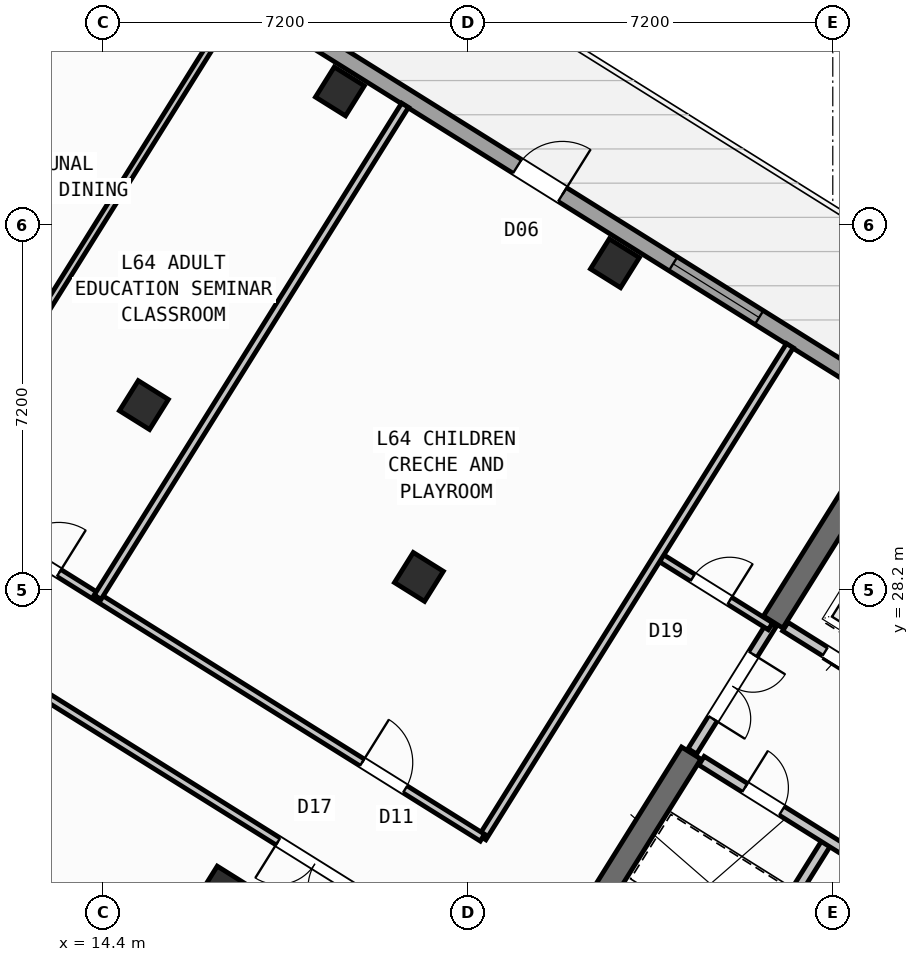
"""IFC4 building model, lengths in metres.
Left out: names, types, materials, properties, quantities, classifications, styles, units other than length and angle.
Written with IfcOpenShell. Run it as: python <this file> out.ifc"""

import sys

from ifc_helpers import new_model, si_unit, direction, frame, frame_2d, origin, origin_2d, place, context, subcontext, project, spatial, rectangle, hollow_rectangle, extrude, source, transform, mapped, element, fill, save


model = new_model("IFC4")
c1 = context("Model", 3, precision=1e-05, world=origin(), true_north=direction((0.0, 1.0)))
c2 = subcontext(c1, "Body", "Model", "MODEL_VIEW")
j1 = project(units=[si_unit("LENGTHUNIT", "METRE"), si_unit("PLANEANGLEUNIT", "RADIAN")], contexts=[c1])
p1 = place(None, origin())
s1 = spatial("IfcSite", under=j1, at=p1, CompositionType="ELEMENT")
p2 = place(p1, origin())
s2 = spatial("IfcBuilding", under=s1, at=p2, CompositionType="ELEMENT")
p3 = place(p2, frame((0.0, 0.0, 254.7)))
s3 = spatial("IfcBuildingStorey", under=s2, at=p3, CompositionType="ELEMENT", Elevation=254.7)
p4 = place(p3, frame((29.544, 30.636, 0.0), z_axis=(0.0, 0.0, 1.0), x_axis=(-0.529902075036, -0.848058836916, 0.0)))
e1 = element("IfcWall", 1, at=p4, inside=s3, PredefinedType="SHEAR", context=c2, shape_type="SweptSolid", body=[
    extrude(rectangle(XDim=3.625, YDim=0.45, at=frame_2d((1.812, 0.0))), origin(), (0.0, 0.0, 1.0), 4.25),
])
p5 = place(p3, frame((26.007, 24.976, 0.0), z_axis=(0.0, 0.0, 1.0), x_axis=(-0.529931155655, -0.848040665456, 0.0)))
e2 = element("IfcWall", 2, at=p5, inside=s3, PredefinedType="SHEAR", context=c2, shape_type="SweptSolid", body=[
    extrude(rectangle(XDim=6.475, YDim=0.45, at=frame_2d((3.238, 0.0))), origin(), (0.0, 0.0, 1.0), 4.25),
])
m1 = source(origin(), c2, "Body", "SweptSolid", [
    extrude(hollow_rectangle(XDim=0.7, YDim=0.7, WallThickness=0.028, at=origin_2d()), origin(), (0.0, 0.0, 1.0), 4.5),
])
for number, where, z_axis, x_axis in (
    (3, (24.5, 34.643, 0.0), (0.0, 0.0, 1.0), (-0.848, 0.53, 0.0)),
    (4, (20.632, 28.452, 0.0), (0.0, 0.0, 1.0), (-0.848, 0.53, 0.0)),
    (5, (16.764, 22.261, 0.0), (0.0, 0.0, 1.0), (-0.848, 0.53, 0.0)),
    (6, (19.073, 38.034, 0.0), (0.0, 0.0, 1.0), (-0.848, 0.53, 0.0)),
    (7, (15.205, 31.844, 0.0), (0.0, 0.0, 1.0), (-0.848, 0.53, 0.0)),
):
    element("IfcColumn", number, at=place(p3, frame(where, z_axis=z_axis, x_axis=x_axis)), inside=s3, PredefinedType="COLUMN", context=c2, shape_type="MappedRepresentation", body=[
        mapped(m1, transform((0.0, 0.0, 0.0), scale=1.0)),
    ])
p6 = place(p3, frame((29.268, 6.429, 0.0), z_axis=(0.0, 0.0, 1.0), x_axis=(-0.848049971435, 0.529916263149, 0.0)))
e8 = element("IfcWall", 8, at=p6, inside=s3, PredefinedType="STANDARD", context=c2, shape_type="SweptSolid", body=[
    extrude(rectangle(XDim=31.588, YDim=0.32, at=frame_2d((15.794, 0.0))), origin(), (0.0, 0.0, 1.0), 4.25),
])
p7 = place(p6, frame((22.349, 0.0, 0.0)))
e9 = element("IfcOpeningElement", 9, at=p7, cuts=e8, PredefinedType="OPENING", context=c2, shape_type="SweptSolid", body=[
    extrude(rectangle(XDim=1.2, YDim=2.15, at=frame_2d((0.6, 1.075))), frame((0.0, 0.17, 0.0), z_axis=(0.0, -1.0, 0.0), x_axis=(1.0, 0.0, 0.0)), (0.0, 0.0, 1.0), 0.34),
])
p8 = place(p6, frame((11.489, 0.0, 0.7)))
e10 = element("IfcOpeningElement", 10, at=p8, cuts=e8, PredefinedType="OPENING", context=c2, shape_type="SweptSolid", body=[
    extrude(rectangle(XDim=2.6, YDim=2.0, at=frame_2d((1.3, 1.0))), frame((0.0, 0.17, 0.0), z_axis=(0.0, -1.0, 0.0), x_axis=(1.0, 0.0, 0.0)), (0.0, 0.0, 1.0), 0.34),
])
p9 = place(p6, frame((17.881, 0.0, 0.75)))
e11 = element("IfcOpeningElement", 11, at=p9, cuts=e8, PredefinedType="OPENING", context=c2, shape_type="SweptSolid", body=[
    extrude(rectangle(XDim=2.0, YDim=1.95, at=frame_2d((1.0, 0.975))), frame((0.0, 0.17, 0.0), z_axis=(0.0, -1.0, 0.0), x_axis=(1.0, 0.0, 0.0)), (0.0, 0.0, 1.0), 0.34),
])
p10 = place(p6, frame((25.501, 0.0, 0.85)))
e12 = element("IfcOpeningElement", 12, at=p10, cuts=e8, PredefinedType="OPENING", context=c2, shape_type="SweptSolid", body=[
    extrude(rectangle(XDim=1.6, YDim=1.8, at=frame_2d((0.8, 0.9))), frame((0.0, 0.17, 0.0), z_axis=(0.0, -1.0, 0.0), x_axis=(1.0, 0.0, 0.0)), (0.0, 0.0, 1.0), 0.34),
])
p11 = place(p6, frame((28.725, 0.0, 0.85)))
e13 = element("IfcOpeningElement", 13, at=p11, cuts=e8, PredefinedType="OPENING", context=c2, shape_type="SweptSolid", body=[
    extrude(rectangle(XDim=1.6, YDim=1.8, at=frame_2d((0.8, 0.9))), frame((0.0, 0.17, 0.0), z_axis=(0.0, -1.0, 0.0), x_axis=(1.0, 0.0, 0.0)), (0.0, 0.0, 1.0), 0.34),
])
p12 = place(p3, frame((2.415, 23.452, 0.0), z_axis=(0.0, 0.0, 1.0), x_axis=(0.52991049553, 0.848053575387, 0.0)))
e14 = element("IfcWall", 14, at=p12, inside=s3, PredefinedType="STANDARD", context=c2, shape_type="SweptSolid", body=[
    extrude(rectangle(XDim=21.587, YDim=0.32, at=frame_2d((10.794, 0.0))), origin(), (0.0, 0.0, 1.0), 3.775),
])
p13 = place(p12, frame((2.131, 0.0, 0.7)))
e15 = element("IfcOpeningElement", 15, at=p13, cuts=e14, PredefinedType="OPENING", context=c2, shape_type="SweptSolid", body=[
    extrude(rectangle(XDim=2.6, YDim=2.0, at=frame_2d((1.3, 1.0))), frame((0.0, 0.17, 0.0), z_axis=(0.0, -1.0, 0.0), x_axis=(1.0, 0.0, 0.0)), (0.0, 0.0, 1.0), 0.34),
])
p14 = place(p12, frame((10.959, 0.0, 0.75)))
e16 = element("IfcOpeningElement", 16, at=p14, cuts=e14, PredefinedType="OPENING", context=c2, shape_type="SweptSolid", body=[
    extrude(rectangle(XDim=2.0, YDim=1.95, at=frame_2d((1.0, 0.975))), frame((0.0, 0.17, 0.0), z_axis=(0.0, -1.0, 0.0), x_axis=(1.0, 0.0, 0.0)), (0.0, 0.0, 1.0), 0.34),
])
p15 = place(p12, frame((15.269, 0.0, 0.85)))
e17 = element("IfcOpeningElement", 17, at=p15, cuts=e14, PredefinedType="OPENING", context=c2, shape_type="SweptSolid", body=[
    extrude(rectangle(XDim=1.6, YDim=1.8, at=frame_2d((0.8, 0.9))), frame((0.0, 0.17, 0.0), z_axis=(0.0, -1.0, 0.0), x_axis=(1.0, 0.0, 0.0)), (0.0, 0.0, 1.0), 0.34),
])
p16 = place(p12, frame((18.219, 0.0, 0.85)))
e18 = element("IfcOpeningElement", 18, at=p16, cuts=e14, PredefinedType="OPENING", context=c2, shape_type="SweptSolid", body=[
    extrude(rectangle(XDim=1.6, YDim=1.8, at=frame_2d((0.8, 0.9))), frame((0.0, 0.17, 0.0), z_axis=(0.0, -1.0, 0.0), x_axis=(1.0, 0.0, 0.0)), (0.0, 0.0, 1.0), 0.34),
])
p17 = place(p3, frame((14.138, 41.825, 0.0), z_axis=(0.0, 0.0, 1.0), x_axis=(0.848046498049, -0.529921821731, 0.0)))
e19 = element("IfcWall", 19, at=p17, inside=s3, PredefinedType="STANDARD", context=c2, shape_type="SweptSolid", body=[
    extrude(rectangle(XDim=31.588, YDim=0.32, at=frame_2d((15.794, 0.0))), origin(), (0.0, 0.0, 1.0), 4.25),
])
p18 = place(p17, frame((9.946, 0.0, 0.0)))
e20 = element("IfcOpeningElement", 20, at=p18, cuts=e19, PredefinedType="OPENING", context=c2, shape_type="SweptSolid", body=[
    extrude(rectangle(XDim=1.05, YDim=2.15, at=frame_2d((0.525, 1.075))), frame((0.0, 0.17, 0.0), z_axis=(0.0, -1.0, 0.0), x_axis=(1.0, 0.0, 0.0)), (0.0, 0.0, 1.0), 0.34),
])
p19 = place(p17, frame((0.763, 0.0, 0.75)))
e21 = element("IfcOpeningElement", 21, at=p19, cuts=e19, PredefinedType="OPENING", context=c2, shape_type="SweptSolid", body=[
    extrude(rectangle(XDim=2.0, YDim=1.95, at=frame_2d((1.0, 0.975))), frame((0.0, 0.17, 0.0), z_axis=(0.0, -1.0, 0.0), x_axis=(1.0, 0.0, 0.0)), (0.0, 0.0, 1.0), 0.34),
])
p20 = place(p17, frame((13.574, 0.0, 0.75)))
e22 = element("IfcOpeningElement", 22, at=p20, cuts=e19, PredefinedType="OPENING", context=c2, shape_type="SweptSolid", body=[
    extrude(rectangle(XDim=2.0, YDim=1.95, at=frame_2d((1.0, 0.975))), frame((0.0, 0.17, 0.0), z_axis=(0.0, -1.0, 0.0), x_axis=(1.0, 0.0, 0.0)), (0.0, 0.0, 1.0), 0.34),
])
p21 = place(p17, frame((21.744, 0.0, 0.85)))
e23 = element("IfcOpeningElement", 23, at=p21, cuts=e19, PredefinedType="OPENING", context=c2, shape_type="SweptSolid", body=[
    extrude(rectangle(XDim=1.6, YDim=1.8, at=frame_2d((0.8, 0.9))), frame((0.0, 0.17, 0.0), z_axis=(0.0, -1.0, 0.0), x_axis=(1.0, 0.0, 0.0)), (0.0, 0.0, 1.0), 0.34),
])
p22 = place(p17, frame((27.444, 0.0, 0.85)))
e24 = element("IfcOpeningElement", 24, at=p22, cuts=e19, PredefinedType="OPENING", context=c2, shape_type="SweptSolid", body=[
    extrude(rectangle(XDim=1.6, YDim=1.8, at=frame_2d((0.8, 0.9))), frame((0.0, 0.17, 0.0), z_axis=(0.0, -1.0, 0.0), x_axis=(1.0, 0.0, 0.0)), (0.0, 0.0, 1.0), 0.34),
])
p23 = place(p3, frame((31.822, 24.998, 0.0), z_axis=(0.0, 0.0, 1.0), x_axis=(-0.848054125777, 0.529909614701, 0.0)))
e25 = element("IfcWall", 25, at=p23, inside=s3, PredefinedType="STANDARD", context=c2, shape_type="SweptSolid", body=[
    extrude(rectangle(XDim=4.668, YDim=0.2, at=frame_2d((2.334, 0.0))), origin(), (0.0, 0.0, 1.0), 4.24),
])
p24 = place(p23, frame((0.52, 0.0, 0.0)))
e26 = element("IfcOpeningElement", 26, at=p24, cuts=e25, PredefinedType="OPENING", context=c2, shape_type="SweptSolid", body=[
    extrude(rectangle(XDim=1.2, YDim=2.15, at=frame_2d((0.6, 1.075))), frame((0.0, 0.11, 0.0), z_axis=(0.0, -1.0, 0.0), x_axis=(1.0, 0.0, 0.0)), (0.0, 0.0, 1.0), 0.22),
])
p25 = place(p23, frame((2.54, 0.0, 0.0)))
e27 = element("IfcOpeningElement", 27, at=p25, cuts=e25, PredefinedType="OPENING", context=c2, shape_type="SweptSolid", body=[
    extrude(rectangle(XDim=1.2, YDim=2.15, at=frame_2d((0.6, 1.075))), frame((0.0, 0.11, 0.0), z_axis=(0.0, -1.0, 0.0), x_axis=(1.0, 0.0, 0.0)), (0.0, 0.0, 1.0), 0.22),
])
p26 = place(p3, frame((28.71, 23.263, 0.0), z_axis=(0.0, 0.0, 1.0), x_axis=(-0.529907497854, -0.848055448493, 0.0)))
e28 = element("IfcWall", 28, at=p26, inside=s3, PredefinedType="STANDARD", context=c2, shape_type="SweptSolid", body=[
    extrude(rectangle(XDim=2.88, YDim=0.2, at=frame_2d((1.44, 0.0))), origin(), (0.0, 0.0, 1.0), 4.24),
])
p27 = place(p3, frame((31.525, 21.504, 0.0), z_axis=(0.0, 0.0, 1.0), x_axis=(-0.848042066329, 0.529928913853, 0.0)))
e29 = element("IfcWall", 29, at=p27, inside=s3, PredefinedType="STANDARD", context=c2, shape_type="SweptSolid", body=[
    extrude(rectangle(XDim=6.268, YDim=0.2, at=frame_2d((3.134, 0.0))), origin(), (0.0, 0.0, 1.0), 4.24),
])
p28 = place(p27, frame((4.4, 0.0, 0.0)))
e30 = element("IfcOpeningElement", 30, at=p28, cuts=e29, PredefinedType="OPENING", context=c2, shape_type="SweptSolid", body=[
    extrude(rectangle(XDim=0.86, YDim=2.05, at=frame_2d((0.43, 1.025))), frame((0.0, 0.11, 0.0), z_axis=(0.0, -1.0, 0.0), x_axis=(1.0, 0.0, 0.0)), (0.0, 0.0, 1.0), 0.22),
])
p29 = place(p27, frame((1.45, 0.0, 0.0)))
e31 = element("IfcOpeningElement", 31, at=p29, cuts=e29, PredefinedType="OPENING", context=c2, shape_type="SweptSolid", body=[
    extrude(rectangle(XDim=0.86, YDim=2.05, at=frame_2d((0.43, 1.025))), frame((0.0, 0.11, 0.0), z_axis=(0.0, -1.0, 0.0), x_axis=(1.0, 0.0, 0.0)), (0.0, 0.0, 1.0), 0.22),
])
p30 = place(p3, frame((27.596, 27.52, 0.0), z_axis=(0.0, 0.0, 1.0), x_axis=(-0.529865479138, -0.848081702443, 0.0)))
e32 = element("IfcWall", 32, at=p30, inside=s3, PredefinedType="STANDARD", context=c2, shape_type="SweptSolid", body=[
    extrude(rectangle(XDim=2.96, YDim=0.2, at=frame_2d((1.48, 0.0))), origin(), (0.0, 0.0, 1.0), 4.24),
])
p31 = place(p30, frame((0.7, 0.0, 0.0)))
e33 = element("IfcOpeningElement", 33, at=p31, cuts=e32, PredefinedType="OPENING", context=c2, shape_type="SweptSolid", body=[
    extrude(rectangle(XDim=1.5, YDim=2.15, at=frame_2d((0.75, 1.075))), frame((0.0, 0.11, 0.0), z_axis=(0.0, -1.0, 0.0), x_axis=(1.0, 0.0, 0.0)), (0.0, 0.0, 1.0), 0.22),
])
p32 = place(p3, frame((27.57, 27.478, 0.0), z_axis=(0.0, 0.0, 1.0), x_axis=(-0.848050851465, 0.529914854792, 0.0)))
e34 = element("IfcWall", 34, at=p32, inside=s3, PredefinedType="PARTITIONING", context=c2, shape_type="SweptSolid", body=[
    extrude(rectangle(XDim=2.61, YDim=0.16, at=frame_2d((1.305, 0.0))), origin(), (0.0, 0.0, 1.0), 4.24),
])
p33 = place(p32, frame((0.95, 0.0, 0.0)))
e35 = element("IfcOpeningElement", 35, at=p33, cuts=e34, PredefinedType="OPENING", context=c2, shape_type="SweptSolid", body=[
    extrude(rectangle(XDim=0.86, YDim=2.05, at=frame_2d((0.43, 1.025))), frame((0.0, 0.09, 0.0), z_axis=(0.0, -1.0, 0.0), x_axis=(1.0, 0.0, 0.0)), (0.0, 0.0, 1.0), 0.18),
])
p34 = place(p3, frame((27.953, 33.016, 0.0), z_axis=(0.0, 0.0, 1.0), x_axis=(-0.529905022231, -0.848056995381, 0.0)))
e36 = element("IfcWall", 36, at=p34, inside=s3, PredefinedType="PARTITIONING", context=c2, shape_type="SweptSolid", body=[
    extrude(rectangle(XDim=11.45, YDim=0.16, at=frame_2d((5.725, 0.0))), origin(), (0.0, 0.0, 1.0), 4.24),
])
p35 = place(p3, frame((21.885, 23.306, 0.0), z_axis=(0.0, 0.0, 1.0), x_axis=(-0.848052408131, 0.529912363569, 0.0)))
e37 = element("IfcWall", 37, at=p35, inside=s3, PredefinedType="PARTITIONING", context=c2, shape_type="SweptSolid", body=[
    extrude(rectangle(XDim=16.73, YDim=0.16, at=frame_2d((8.365, 0.0))), origin(), (0.0, 0.0, 1.0), 4.24),
])
p36 = place(p35, frame((1.8, 0.0, 0.0)))
e38 = element("IfcOpeningElement", 38, at=p36, cuts=e37, PredefinedType="OPENING", context=c2, shape_type="SweptSolid", body=[
    extrude(rectangle(XDim=1.0, YDim=2.1, at=frame_2d((0.5, 1.05))), frame((0.0, 0.09, 0.0), z_axis=(0.0, -1.0, 0.0), x_axis=(1.0, 0.0, 0.0)), (0.0, 0.0, 1.0), 0.18),
])
p37 = place(p35, frame((9.855, 0.0, 0.0)))
e39 = element("IfcOpeningElement", 39, at=p37, cuts=e37, PredefinedType="OPENING", context=c2, shape_type="SweptSolid", body=[
    extrude(rectangle(XDim=1.0, YDim=2.1, at=frame_2d((0.5, 1.05))), frame((0.0, 0.09, 0.0), z_axis=(0.0, -1.0, 0.0), x_axis=(1.0, 0.0, 0.0)), (0.0, 0.0, 1.0), 0.18),
])
p38 = place(p35, frame((13.732, 0.0, 0.0)))
e40 = element("IfcOpeningElement", 40, at=p38, cuts=e37, PredefinedType="OPENING", context=c2, shape_type="SweptSolid", body=[
    extrude(rectangle(XDim=1.0, YDim=2.1, at=frame_2d((0.5, 1.05))), frame((0.0, 0.09, 0.0), z_axis=(0.0, -1.0, 0.0), x_axis=(1.0, 0.0, 0.0)), (0.0, 0.0, 1.0), 0.18),
])
p39 = place(p3, frame((20.719, 21.44, 0.0), z_axis=(0.0, 0.0, 1.0), x_axis=(-0.848048310262, 0.529918921593, 0.0)))
e41 = element("IfcWall", 41, at=p39, inside=s3, PredefinedType="PARTITIONING", context=c2, shape_type="SweptSolid", body=[
    extrude(rectangle(XDim=16.73, YDim=0.16, at=frame_2d((8.365, 0.0))), origin(), (0.0, 0.0, 1.0), 4.24),
])
p40 = place(p39, frame((1.68, 0.0, 0.0)))
e42 = element("IfcOpeningElement", 42, at=p40, cuts=e41, PredefinedType="OPENING", context=c2, shape_type="SweptSolid", body=[
    extrude(rectangle(XDim=1.7, YDim=2.2, at=frame_2d((0.85, 1.1))), frame((0.0, 0.09, 0.0), z_axis=(0.0, -1.0, 0.0), x_axis=(1.0, 0.0, 0.0)), (0.0, 0.0, 1.0), 0.18),
])
p41 = place(p39, frame((10.595, 0.0, 0.0)))
e43 = element("IfcOpeningElement", 43, at=p41, cuts=e41, PredefinedType="OPENING", context=c2, shape_type="SweptSolid", body=[
    extrude(rectangle(XDim=1.7, YDim=2.2, at=frame_2d((0.85, 1.1))), frame((0.0, 0.09, 0.0), z_axis=(0.0, -1.0, 0.0), x_axis=(1.0, 0.0, 0.0)), (0.0, 0.0, 1.0), 0.18),
])
p42 = place(p3, frame((20.359, 37.761, 0.0), z_axis=(0.0, 0.0, 1.0), x_axis=(-0.529905022231, -0.848056995381, 0.0)))
e44 = element("IfcWall", 44, at=p42, inside=s3, PredefinedType="PARTITIONING", context=c2, shape_type="SweptSolid", body=[
    extrude(rectangle(XDim=11.45, YDim=0.16, at=frame_2d((5.725, 0.0))), origin(), (0.0, 0.0, 1.0), 4.24),
])
p43 = place(p3, frame((17.15, 39.943, 0.0), z_axis=(0.0, 0.0, 1.0), x_axis=(-0.529936507712, -0.848037320991, 0.0)))
e45 = element("IfcWall", 45, at=p43, inside=s3, PredefinedType="PLUMBINGWALL", context=c2, shape_type="SweptSolid", body=[
    extrude(rectangle(XDim=11.6, YDim=0.14, at=frame_2d((5.8, 0.0))), origin(), (0.0, 0.0, 1.0), 4.24),
])
m2 = source(origin(), c2, "Body", "SweptSolid", [
    extrude(rectangle(XDim=1.05, YDim=2.15, at=frame_2d((0.525, 1.075))), frame((0.0, 0.025, 0.0), z_axis=(0.0, -1.0, 0.0), x_axis=(1.0, 0.0, 0.0)), (0.0, 0.0, 1.0), 0.05),
])
p44 = place(p18, origin())
e46 = element("IfcDoor", 46, at=p44, inside=s3, OperationType="SINGLE_SWING_RIGHT", PredefinedType="DOOR", context=c2, shape_type="MappedRepresentation", body=[
    mapped(m2, transform((0.0, 0.0, 0.0), scale=1.0)),
])
fill(e20, e46)
m3 = source(origin(), c2, "Body", "SweptSolid", [
    extrude(rectangle(XDim=2.0, YDim=1.95, at=frame_2d((1.0, 0.975))), frame((0.0, 0.03, 0.0), z_axis=(0.0, -1.0, 0.0), x_axis=(1.0, 0.0, 0.0)), (0.0, 0.0, 1.0), 0.06),
])
p45 = place(p20, origin())
e47 = element("IfcWindow", 47, at=p45, inside=s3, PartitioningType="SINGLE_PANEL", PredefinedType="WINDOW", context=c2, shape_type="MappedRepresentation", body=[
    mapped(m3, transform((0.0, 0.0, 0.0), scale=1.0)),
])
fill(e22, e47)
m4 = source(origin(), c2, "Body", "SweptSolid", [
    extrude(rectangle(XDim=1.2, YDim=2.15, at=frame_2d((0.6, 1.075))), frame((0.0, 0.025, 0.0), z_axis=(0.0, -1.0, 0.0), x_axis=(1.0, 0.0, 0.0)), (0.0, 0.0, 1.0), 0.05),
])
p46 = place(p25, origin())
e48 = element("IfcDoor", 48, at=p46, inside=s3, OperationType="DOUBLE_DOOR_SLIDING", PredefinedType="DOOR", context=c2, shape_type="MappedRepresentation", body=[
    mapped(m4, transform((0.0, 0.0, 0.0), scale=1.0)),
])
fill(e27, e48)
m5 = source(origin(), c2, "Body", "SweptSolid", [
    extrude(rectangle(XDim=0.86, YDim=2.05, at=frame_2d((0.43, 1.025))), frame((0.0, 0.025, 0.0), z_axis=(0.0, -1.0, 0.0), x_axis=(1.0, 0.0, 0.0)), (0.0, 0.0, 1.0), 0.05),
])
p47 = place(p28, frame((0.86, 0.0, 0.0), z_axis=(0.0, 0.0, 1.0), x_axis=(-1.0, 0.0, 0.0)))
e49 = element("IfcDoor", 49, at=p47, inside=s3, OperationType="SINGLE_SWING_LEFT", PredefinedType="DOOR", context=c2, shape_type="MappedRepresentation", body=[
    mapped(m5, transform((0.0, 0.0, 0.0), scale=1.0)),
])
fill(e30, e49)
p48 = place(p33, frame((0.86, 0.0, 0.0), z_axis=(0.0, 0.0, 1.0), x_axis=(-1.0, 0.0, 0.0)))
e50 = element("IfcDoor", 50, at=p48, inside=s3, OperationType="SINGLE_SWING_RIGHT", PredefinedType="DOOR", context=c2, shape_type="MappedRepresentation", body=[
    mapped(m5, transform((0.0, 0.0, 0.0), scale=1.0)),
])
fill(e35, e50)
m6 = source(origin(), c2, "Body", "SweptSolid", [
    extrude(rectangle(XDim=1.5, YDim=2.15, at=frame_2d((0.75, 1.075))), frame((0.0, 0.025, 0.0), z_axis=(0.0, -1.0, 0.0), x_axis=(1.0, 0.0, 0.0)), (0.0, 0.0, 1.0), 0.05),
])
p49 = place(p31, origin())
e51 = element("IfcDoor", 51, at=p49, inside=s3, OperationType="DOUBLE_DOOR_SINGLE_SWING", PredefinedType="DOOR", context=c2, shape_type="MappedRepresentation", body=[
    mapped(m6, transform((0.0, 0.0, 0.0), scale=1.0)),
])
fill(e33, e51)
m7 = source(origin(), c2, "Body", "SweptSolid", [
    extrude(rectangle(XDim=1.7, YDim=2.2, at=frame_2d((0.85, 1.1))), frame((0.0, 0.025, 0.0), z_axis=(0.0, -1.0, 0.0), x_axis=(1.0, 0.0, 0.0)), (0.0, 0.0, 1.0), 0.05),
])
p50 = place(p40, origin())
e52 = element("IfcDoor", 52, at=p50, inside=s3, OperationType="DOUBLE_DOOR_SINGLE_SWING", PredefinedType="DOOR", context=c2, shape_type="MappedRepresentation", body=[
    mapped(m7, transform((0.0, 0.0, 0.0), scale=1.0)),
])
fill(e42, e52)
m8 = source(origin(), c2, "Body", "SweptSolid", [
    extrude(rectangle(XDim=1.0, YDim=2.1, at=frame_2d((0.5, 1.05))), frame((0.0, 0.025, 0.0), z_axis=(0.0, -1.0, 0.0), x_axis=(1.0, 0.0, 0.0)), (0.0, 0.0, 1.0), 0.05),
])
p51 = place(p36, frame((1.0, 0.0, 0.0), z_axis=(0.0, 0.0, 1.0), x_axis=(-1.0, 0.0, 0.0)))
e53 = element("IfcDoor", 53, at=p51, inside=s3, OperationType="SINGLE_SWING_LEFT", PredefinedType="DOOR", context=c2, shape_type="MappedRepresentation", body=[
    mapped(m8, transform((0.0, 0.0, 0.0), scale=1.0)),
])
fill(e38, e53)
p52 = place(p37, frame((1.0, 0.0, 0.0), z_axis=(0.0, 0.0, 1.0), x_axis=(-1.0, 0.0, 0.0)))
e54 = element("IfcDoor", 54, at=p52, inside=s3, OperationType="SINGLE_SWING_RIGHT", PredefinedType="DOOR", context=c2, shape_type="MappedRepresentation", body=[
    mapped(m8, transform((0.0, 0.0, 0.0), scale=1.0)),
])
fill(e39, e54)
save(model, sys.argv[1])
